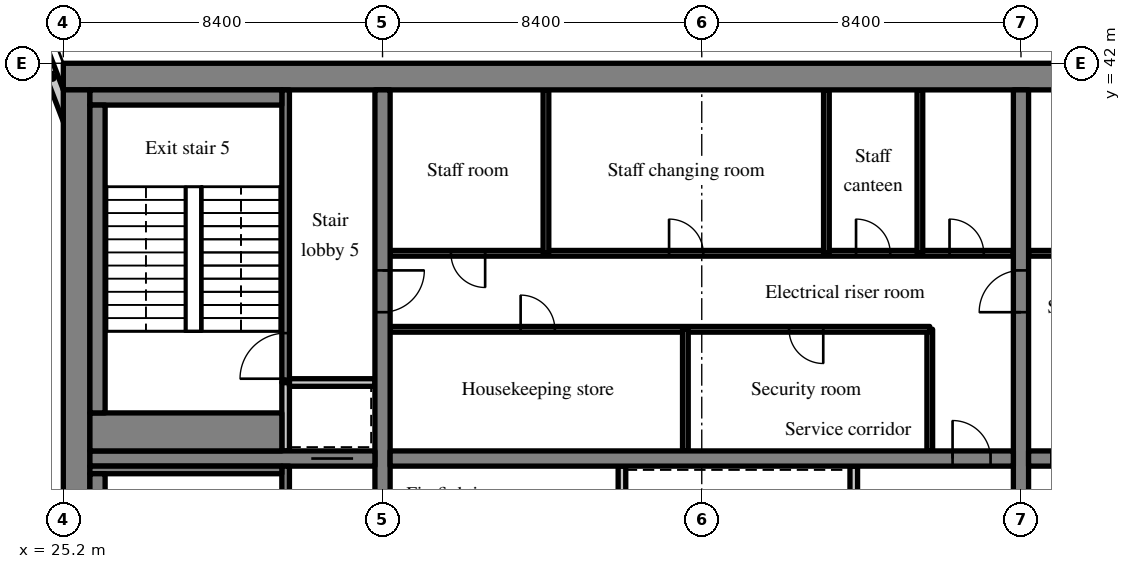
"""IFC4 building model, lengths in metres.
Left out: names, types, materials, properties, quantities, classifications, styles, units other than length and angle.
Written with IfcOpenShell. Run it as: python <this file> out.ifc"""

import sys

from ifc_helpers import new_model, si_unit, direction, frame, frame_2d, origin, place, context, subcontext, project, spatial, rectangle, extrude, source, transform, mapped, element, fill, save


model = new_model("IFC4")
c1 = context("Model", 3, precision=1e-05, world=origin(), true_north=direction((0.0, 1.0)))
c2 = subcontext(c1, "Body", "Model", "MODEL_VIEW")
j1 = project(units=[si_unit("LENGTHUNIT", "METRE"), si_unit("PLANEANGLEUNIT", "RADIAN")], contexts=[c1])
p1 = place(None, origin())
s1 = spatial("IfcSite", under=j1, at=p1, CompositionType="ELEMENT")
p2 = place(p1, origin())
s2 = spatial("IfcBuilding", under=s1, at=p2, CompositionType="ELEMENT")
p3 = place(p2, frame((0.0, 0.0, 178.2)))
s3 = spatial("IfcBuildingStorey", under=s2, at=p3, CompositionType="ELEMENT", Elevation=178.2)
m1 = source(origin(), c2, "Body", "SweptSolid", [
    extrude(rectangle(XDim=50.4, YDim=0.7, at=frame_2d((25.2, 0.0))), origin(), (0.0, 0.0, 1.0), 3.52),
])
p4 = place(p3, frame((25.2, 41.65, 0.0), z_axis=(0.0, 0.0, 1.0), x_axis=(1.0, 0.0, 0.0)))
e1 = element("IfcWall", 1, at=p4, inside=s3, PredefinedType="SHEAR", context=c2, shape_type="MappedRepresentation", body=[
    mapped(m1, transform((0.0, 0.0, 0.0), scale=1.0)),
])
m2 = source(origin(), c2, "Body", "SweptSolid", [
    extrude(rectangle(XDim=18.6, YDim=0.7, at=frame_2d((9.3, 0.0))), origin(), (0.0, 0.0, 1.0), 3.52),
])
p5 = place(p3, frame((25.55, 22.7, 0.0), z_axis=(0.0, 0.0, 1.0), x_axis=(0.0, 1.0, 0.0)))
e2 = element("IfcWall", 2, at=p5, inside=s3, PredefinedType="SHEAR", context=c2, shape_type="MappedRepresentation", body=[
    mapped(m2, transform((0.0, 0.0, 0.0), scale=1.0)),
])
m3 = source(origin(), c2, "Body", "SweptSolid", [
    extrude(rectangle(XDim=18.6, YDim=0.4, at=frame_2d((9.3, 0.0))), origin(), (0.0, 0.0, 1.0), 3.52),
])
p6 = place(p3, frame((33.6, 22.7, 0.0), z_axis=(0.0, 0.0, 1.0), x_axis=(0.0, 1.0, 0.0)))
e3 = element("IfcWall", 3, at=p6, inside=s3, PredefinedType="SHEAR", context=c2, shape_type="MappedRepresentation", body=[
    mapped(m3, transform((0.0, 0.0, 0.0), scale=1.0)),
])
m4 = source(origin(), c2, "Body", "SweptSolid", [
    extrude(rectangle(XDim=1.1, YDim=2.1, at=frame_2d((0.55, 1.05))), frame((0.0, 0.21, 0.0), z_axis=(0.0, -1.0, 0.0), x_axis=(1.0, 0.0, 0.0)), (0.0, 0.0, 1.0), 0.42),
])
p7 = place(p6, frame((12.75, 0.0, 0.0)))
e4 = element("IfcOpeningElement", 4, at=p7, cuts=e3, PredefinedType="OPENING", context=c2, shape_type="MappedRepresentation", body=[
    mapped(m4, transform((0.0, 0.0, 0.0), scale=1.0)),
])
p8 = place(p3, frame((50.4, 22.7, 0.0), z_axis=(0.0, 0.0, 1.0), x_axis=(0.0, 1.0, 0.0)))
e5 = element("IfcWall", 5, at=p8, inside=s3, PredefinedType="SHEAR", context=c2, shape_type="MappedRepresentation", body=[
    mapped(m3, transform((0.0, 0.0, 0.0), scale=1.0)),
])
p9 = place(p8, frame((12.75, 0.0, 0.0)))
e6 = element("IfcOpeningElement", 6, at=p9, cuts=e5, PredefinedType="OPENING", context=c2, shape_type="MappedRepresentation", body=[
    mapped(m4, transform((0.0, 0.0, 0.0), scale=1.0)),
])
m5 = source(origin(), c2, "Body", "SweptSolid", [
    extrude(rectangle(XDim=7.5, YDim=0.4, at=frame_2d((3.75, 0.0))), origin(), (0.0, 0.0, 1.0), 3.52),
])
p10 = place(p3, frame((25.9, 31.6, 0.0), z_axis=(0.0, 0.0, 1.0), x_axis=(1.0, 0.0, 0.0)))
e7 = element("IfcWall", 7, at=p10, inside=s3, PredefinedType="SHEAR", context=c2, shape_type="MappedRepresentation", body=[
    mapped(m5, transform((0.0, 0.0, 0.0), scale=1.0)),
])
p11 = place(p10, frame((5.825, 0.0, 0.0)))
e8 = element("IfcOpeningElement", 8, at=p11, cuts=e7, PredefinedType="OPENING", context=c2, shape_type="MappedRepresentation", body=[
    mapped(m4, transform((0.0, 0.0, 0.0), scale=1.0)),
])
m6 = source(origin(), c2, "Body", "SweptSolid", [
    extrude(rectangle(XDim=16.4, YDim=0.4, at=frame_2d((8.2, 0.0))), origin(), (0.0, 0.0, 1.0), 3.52),
])
p12 = place(p3, frame((33.8, 31.6, 0.0), z_axis=(0.0, 0.0, 1.0), x_axis=(1.0, 0.0, 0.0)))
e9 = element("IfcWall", 9, at=p12, inside=s3, PredefinedType="SHEAR", context=c2, shape_type="MappedRepresentation", body=[
    mapped(m6, transform((0.0, 0.0, 0.0), scale=1.0)),
])
m7 = source(origin(), c2, "Body", "SweptSolid", [
    extrude(rectangle(XDim=1.0, YDim=2.1, at=frame_2d((0.5, 1.05))), frame((0.0, 0.21, 0.0), z_axis=(0.0, -1.0, 0.0), x_axis=(1.0, 0.0, 0.0)), (0.0, 0.0, 1.0), 0.42),
])
p13 = place(p12, frame((14.8, 0.0, 0.0)))
e10 = element("IfcOpeningElement", 10, at=p13, cuts=e9, PredefinedType="OPENING", context=c2, shape_type="MappedRepresentation", body=[
    mapped(m7, transform((0.0, 0.0, 0.0), scale=1.0)),
])
p14 = place(p3, frame((50.6, 31.6, 0.0), z_axis=(0.0, 0.0, 1.0), x_axis=(1.0, 0.0, 0.0)))
e11 = element("IfcWall", 11, at=p14, inside=s3, PredefinedType="SHEAR", context=c2, shape_type="MappedRepresentation", body=[
    mapped(m6, transform((0.0, 0.0, 0.0), scale=1.0)),
])
p15 = place(p14, frame((0.6, 0.0, 0.0)))
e12 = element("IfcOpeningElement", 12, at=p15, cuts=e11, PredefinedType="OPENING", context=c2, shape_type="MappedRepresentation", body=[
    mapped(m7, transform((0.0, 0.0, 0.0), scale=1.0)),
])
m8 = source(origin(), c2, "Body", "SweptSolid", [
    extrude(rectangle(XDim=3.559, YDim=0.3, at=frame_2d((1.78, 0.0))), origin(), (0.0, 0.0, 1.0), 3.52),
])
p16 = place(p3, frame((25.55, 39.969, 0.0), z_axis=(0.0, 0.0, 1.0), x_axis=(-0.35779745313, 0.933799219604, 0.0)))
e13 = element("IfcWall", 13, at=p16, inside=s3, PredefinedType="SOLIDWALL", context=c2, shape_type="MappedRepresentation", body=[
    mapped(m8, transform((0.0, 0.0, 0.0), scale=1.0)),
])
m9 = source(origin(), c2, "Body", "SweptSolid", [
    extrude(rectangle(XDim=1.5, YDim=2.0, at=frame_2d((0.75, 1.0))), frame((0.0, 0.16, 0.0), z_axis=(0.0, -1.0, 0.0), x_axis=(1.0, 0.0, 0.0)), (0.0, 0.0, 1.0), 0.32),
])
p17 = place(p16, frame((1.903, 0.0, 0.9)))
e14 = element("IfcOpeningElement", 14, at=p17, cuts=e13, PredefinedType="OPENING", context=c2, shape_type="MappedRepresentation", body=[
    mapped(m9, transform((0.0, 0.0, 0.0), scale=1.0)),
])
m10 = source(origin(), c2, "Body", "SweptSolid", [
    extrude(rectangle(XDim=8.7, YDim=0.2, at=frame_2d((4.35, 0.0))), origin(), (0.0, 0.0, 1.0), 3.52),
])
p18 = place(p3, frame((39.9, 22.7, 0.0), z_axis=(0.0, 0.0, 1.0), x_axis=(0.0, 1.0, 0.0)))
e15 = element("IfcWall", 15, at=p18, inside=s3, PredefinedType="PARTITIONING", context=c2, shape_type="MappedRepresentation", body=[
    mapped(m10, transform((0.0, 0.0, 0.0), scale=1.0)),
])
m11 = source(origin(), c2, "Body", "SweptSolid", [
    extrude(rectangle(XDim=0.9, YDim=2.1, at=frame_2d((0.45, 1.05))), frame((0.0, 0.11, 0.0), z_axis=(0.0, -1.0, 0.0), x_axis=(1.0, 0.0, 0.0)), (0.0, 0.0, 1.0), 0.22),
])
p19 = place(p18, frame((4.85, 0.0, 0.0)))
e16 = element("IfcOpeningElement", 16, at=p19, cuts=e15, PredefinedType="OPENING", context=c2, shape_type="MappedRepresentation", body=[
    mapped(m11, transform((0.0, 0.0, 0.0), scale=1.0)),
])
m12 = source(origin(), c2, "Body", "SweptSolid", [
    extrude(rectangle(XDim=2.6, YDim=0.2, at=frame_2d((1.3, 0.0))), origin(), (0.0, 0.0, 1.0), 3.52),
])
p20 = place(p3, frame((46.0, 28.8, 0.0), z_axis=(0.0, 0.0, 1.0), x_axis=(0.0, 1.0, 0.0)))
e17 = element("IfcWall", 17, at=p20, inside=s3, PredefinedType="SOLIDWALL", context=c2, shape_type="MappedRepresentation", body=[
    mapped(m12, transform((0.0, 0.0, 0.0), scale=1.0)),
])
m13 = source(origin(), c2, "Body", "SweptSolid", [
    extrude(rectangle(XDim=3.2, YDim=0.15, at=frame_2d((1.6, 0.0))), origin(), (0.0, 0.0, 1.0), 3.52),
])
p21 = place(p3, frame((48.0, 31.8, 0.0), z_axis=(0.0, 0.0, 1.0), x_axis=(0.0, 1.0, 0.0)))
e18 = element("IfcWall", 18, at=p21, inside=s3, PredefinedType="PARTITIONING", context=c2, shape_type="MappedRepresentation", body=[
    mapped(m13, transform((0.0, 0.0, 0.0), scale=1.0)),
])
m14 = source(origin(), c2, "Body", "SweptSolid", [
    extrude(rectangle(XDim=14.2, YDim=0.15, at=frame_2d((7.1, 0.0))), origin(), (0.0, 0.0, 1.0), 3.52),
])
p22 = place(p3, frame((33.8, 35.0, 0.0), z_axis=(0.0, 0.0, 1.0), x_axis=(1.0, 0.0, 0.0)))
e19 = element("IfcWall", 19, at=p22, inside=s3, PredefinedType="PARTITIONING", context=c2, shape_type="MappedRepresentation", body=[
    mapped(m14, transform((0.0, 0.0, 0.0), scale=1.0)),
])
m15 = source(origin(), c2, "Body", "SweptSolid", [
    extrude(rectangle(XDim=0.9, YDim=2.1, at=frame_2d((0.45, 1.05))), frame((0.0, 0.085, 0.0), z_axis=(0.0, -1.0, 0.0), x_axis=(1.0, 0.0, 0.0)), (0.0, 0.0, 1.0), 0.17),
])
p23 = place(p22, frame((3.434, 0.0, 0.0)))
e20 = element("IfcOpeningElement", 20, at=p23, cuts=e19, PredefinedType="OPENING", context=c2, shape_type="MappedRepresentation", body=[
    mapped(m15, transform((0.0, 0.0, 0.0), scale=1.0)),
])
p24 = place(p22, frame((10.497, 0.0, 0.0)))
e21 = element("IfcOpeningElement", 21, at=p24, cuts=e19, PredefinedType="OPENING", context=c2, shape_type="MappedRepresentation", body=[
    mapped(m15, transform((0.0, 0.0, 0.0), scale=1.0)),
])
m16 = source(origin(), c2, "Body", "SweptSolid", [
    extrude(rectangle(XDim=16.4, YDim=0.15, at=frame_2d((8.2, 0.0))), origin(), (0.0, 0.0, 1.0), 3.52),
])
p25 = place(p3, frame((33.8, 37.0, 0.0), z_axis=(0.0, 0.0, 1.0), x_axis=(1.0, 0.0, 0.0)))
e22 = element("IfcWall", 22, at=p25, inside=s3, PredefinedType="PARTITIONING", context=c2, shape_type="MappedRepresentation", body=[
    mapped(m16, transform((0.0, 0.0, 0.0), scale=1.0)),
])
p26 = place(p25, frame((1.6, 0.0, 0.0)))
e23 = element("IfcOpeningElement", 23, at=p26, cuts=e22, PredefinedType="OPENING", context=c2, shape_type="MappedRepresentation", body=[
    mapped(m15, transform((0.0, 0.0, 0.0), scale=1.0)),
])
p27 = place(p25, frame((7.34, 0.0, 0.0)))
e24 = element("IfcOpeningElement", 24, at=p27, cuts=e22, PredefinedType="OPENING", context=c2, shape_type="MappedRepresentation", body=[
    mapped(m15, transform((0.0, 0.0, 0.0), scale=1.0)),
])
p28 = place(p25, frame((12.26, 0.0, 0.0)))
e25 = element("IfcOpeningElement", 25, at=p28, cuts=e22, PredefinedType="OPENING", context=c2, shape_type="MappedRepresentation", body=[
    mapped(m15, transform((0.0, 0.0, 0.0), scale=1.0)),
])
p29 = place(p25, frame((14.72, 0.0, 0.0)))
e26 = element("IfcOpeningElement", 26, at=p29, cuts=e22, PredefinedType="OPENING", context=c2, shape_type="MappedRepresentation", body=[
    mapped(m15, transform((0.0, 0.0, 0.0), scale=1.0)),
])
p30 = place(p3, frame((41.569, 31.8, 0.0), z_axis=(0.0, 0.0, 1.0), x_axis=(0.0, 1.0, 0.0)))
e27 = element("IfcWall", 27, at=p30, inside=s3, PredefinedType="PARTITIONING", context=c2, shape_type="MappedRepresentation", body=[
    mapped(m13, transform((0.0, 0.0, 0.0), scale=1.0)),
])
m17 = source(origin(), c2, "Body", "SweptSolid", [
    extrude(rectangle(XDim=4.3, YDim=0.15, at=frame_2d((2.15, 0.0))), origin(), (0.0, 0.0, 1.0), 3.52),
])
for number, where, z_axis, x_axis in (
    (28, (37.9, 37.0, 0.0), (0.0, 0.0, 1.0), (0.0, 1.0, 0.0)),
    (29, (45.28, 37.0, 0.0), (0.0, 0.0, 1.0), (0.0, 1.0, 0.0)),
    (30, (47.74, 37.0, 0.0), (0.0, 0.0, 1.0), (0.0, 1.0, 0.0)),
):
    element("IfcWall", number, at=place(p3, frame(where, z_axis=z_axis, x_axis=x_axis)), inside=s3, PredefinedType="PARTITIONING", context=c2, shape_type="MappedRepresentation", body=[
        mapped(m17, transform((0.0, 0.0, 0.0), scale=1.0)),
    ])
p31 = place(p3, frame((67.0, 37.0, 0.0), z_axis=(0.0, 0.0, 1.0), x_axis=(-1.0, 0.0, 0.0)))
e31 = element("IfcWall", 31, at=p31, inside=s3, PredefinedType="PARTITIONING", context=c2, shape_type="MappedRepresentation", body=[
    mapped(m16, transform((0.0, 0.0, 0.0), scale=1.0)),
])
p32 = place(p31, frame((3.24, 0.0, 0.0)))
e32 = element("IfcOpeningElement", 32, at=p32, cuts=e31, PredefinedType="OPENING", context=c2, shape_type="MappedRepresentation", body=[
    mapped(m15, transform((0.0, 0.0, 0.0), scale=1.0)),
])
p33 = place(p31, frame((8.16, 0.0, 0.0)))
e33 = element("IfcOpeningElement", 33, at=p33, cuts=e31, PredefinedType="OPENING", context=c2, shape_type="MappedRepresentation", body=[
    mapped(m15, transform((0.0, 0.0, 0.0), scale=1.0)),
])
p34 = place(p31, frame((11.44, 0.0, 0.0)))
e34 = element("IfcOpeningElement", 34, at=p34, cuts=e31, PredefinedType="OPENING", context=c2, shape_type="MappedRepresentation", body=[
    mapped(m15, transform((0.0, 0.0, 0.0), scale=1.0)),
])
p35 = place(p31, frame((14.72, 0.0, 0.0)))
e35 = element("IfcOpeningElement", 35, at=p35, cuts=e31, PredefinedType="OPENING", context=c2, shape_type="MappedRepresentation", body=[
    mapped(m15, transform((0.0, 0.0, 0.0), scale=1.0)),
])
m18 = source(origin(), c2, "Body", "SweptSolid", [
    extrude(rectangle(XDim=8.7, YDim=0.2, at=frame_2d((4.35, 0.0))), origin(), (0.0, 0.0, 1.0), 3.52),
])
p36 = place(p3, frame((31.05, 22.7, 0.0), z_axis=(0.0, 0.0, 1.0), x_axis=(0.0, 1.0, 0.0)))
e36 = element("IfcWall", 36, at=p36, inside=s3, PredefinedType="SOLIDWALL", context=c2, shape_type="MappedRepresentation", body=[
    mapped(m18, transform((0.0, 0.0, 0.0), scale=1.0)),
])
m19 = source(origin(), c2, "Body", "SweptSolid", [
    extrude(rectangle(XDim=1.2, YDim=2.1, at=frame_2d((0.6, 1.05))), frame((0.0, 0.11, 0.0), z_axis=(0.0, -1.0, 0.0), x_axis=(1.0, 0.0, 0.0)), (0.0, 0.0, 1.0), 0.22),
])
p37 = place(p36, frame((0.9, 0.0, 0.0)))
e37 = element("IfcOpeningElement", 37, at=p37, cuts=e36, PredefinedType="OPENING", context=c2, shape_type="MappedRepresentation", body=[
    mapped(m19, transform((0.0, 0.0, 0.0), scale=1.0)),
])
m20 = source(origin(), c2, "Body", "SweptSolid", [
    extrude(rectangle(XDim=1.8, YDim=0.2, at=frame_2d((0.9, 0.0))), origin(), (0.0, 0.0, 1.0), 3.52),
])
p38 = place(p3, frame((31.05, 31.8, 0.0), z_axis=(0.0, 0.0, 1.0), x_axis=(0.0, 1.0, 0.0)))
e38 = element("IfcWall", 38, at=p38, inside=s3, PredefinedType="SOLIDWALL", context=c2, shape_type="MappedRepresentation", body=[
    mapped(m20, transform((0.0, 0.0, 0.0), scale=1.0)),
])
m21 = source(origin(), c2, "Body", "SweptSolid", [
    extrude(rectangle(XDim=2.25, YDim=0.2, at=frame_2d((1.125, 0.0))), origin(), (0.0, 0.0, 1.0), 3.52),
])
p39 = place(p3, frame((31.15, 33.6, 0.0), z_axis=(0.0, 0.0, 1.0), x_axis=(1.0, 0.0, 0.0)))
e39 = element("IfcWall", 39, at=p39, inside=s3, PredefinedType="SOLIDWALL", context=c2, shape_type="MappedRepresentation", body=[
    mapped(m21, transform((0.0, 0.0, 0.0), scale=1.0)),
])
m22 = source(origin(), c2, "Body", "SweptSolid", [
    extrude(rectangle(XDim=7.7, YDim=0.2, at=frame_2d((3.85, 0.0))), origin(), (0.0, 0.0, 1.0), 3.52),
])
p40 = place(p3, frame((31.05, 33.6, 0.0), z_axis=(0.0, 0.0, 1.0), x_axis=(0.0, 1.0, 0.0)))
e40 = element("IfcWall", 40, at=p40, inside=s3, PredefinedType="SOLIDWALL", context=c2, shape_type="MappedRepresentation", body=[
    mapped(m22, transform((0.0, 0.0, 0.0), scale=1.0)),
])
p41 = place(p40, frame((0.1, 0.0, 0.0)))
e41 = element("IfcOpeningElement", 41, at=p41, cuts=e40, PredefinedType="OPENING", context=c2, shape_type="MappedRepresentation", body=[
    mapped(m19, transform((0.0, 0.0, 0.0), scale=1.0)),
])
m23 = source(origin(), c2, "Body", "SweptSolid", [
    extrude(rectangle(XDim=5.05, YDim=0.2, at=frame_2d((2.525, 0.0))), origin(), (0.0, 0.0, 1.0), 3.52),
])
p42 = place(p3, frame((25.9, 31.3, 0.0), z_axis=(0.0, 0.0, 1.0), x_axis=(1.0, 0.0, 0.0)))
e42 = element("IfcWall", 42, at=p42, inside=s3, PredefinedType="SOLIDWALL", context=c2, shape_type="MappedRepresentation", body=[
    mapped(m23, transform((0.0, 0.0, 0.0), scale=1.0)),
])
m24 = source(origin(), c2, "Body", "SweptSolid", [
    extrude(rectangle(XDim=8.1, YDim=0.4, at=frame_2d((4.05, 0.0))), origin(), (0.0, 0.0, 1.0), 3.52),
])
p43 = place(p3, frame((26.1, 23.1, 0.0), z_axis=(0.0, 0.0, 1.0), x_axis=(0.0, 1.0, 0.0)))
e43 = element("IfcWall", 43, at=p43, inside=s3, PredefinedType="SOLIDWALL", context=c2, shape_type="MappedRepresentation", body=[
    mapped(m24, transform((0.0, 0.0, 0.0), scale=1.0)),
])
m25 = source(origin(), c2, "Body", "SweptSolid", [
    extrude(rectangle(XDim=5.05, YDim=0.4, at=frame_2d((2.525, 0.0))), origin(), (0.0, 0.0, 1.0), 3.52),
])
p44 = place(p3, frame((25.9, 41.1, 0.0), z_axis=(0.0, 0.0, 1.0), x_axis=(1.0, 0.0, 0.0)))
e44 = element("IfcWall", 44, at=p44, inside=s3, PredefinedType="SOLIDWALL", context=c2, shape_type="MappedRepresentation", body=[
    mapped(m25, transform((0.0, 0.0, 0.0), scale=1.0)),
])
m26 = source(origin(), c2, "Body", "SweptSolid", [
    extrude(rectangle(XDim=5.05, YDim=1.0, at=frame_2d((2.525, 0.0))), origin(), (0.0, 0.0, 1.0), 3.52),
])
p45 = place(p3, frame((25.9, 32.3, 0.0), z_axis=(0.0, 0.0, 1.0), x_axis=(1.0, 0.0, 0.0)))
e45 = element("IfcWall", 45, at=p45, inside=s3, PredefinedType="SOLIDWALL", context=c2, shape_type="MappedRepresentation", body=[
    mapped(m26, transform((0.0, 0.0, 0.0), scale=1.0)),
])
p46 = place(p3, frame((26.1, 32.8, 0.0), z_axis=(0.0, 0.0, 1.0), x_axis=(0.0, 1.0, 0.0)))
e46 = element("IfcWall", 46, at=p46, inside=s3, PredefinedType="SOLIDWALL", context=c2, shape_type="MappedRepresentation", body=[
    mapped(m24, transform((0.0, 0.0, 0.0), scale=1.0)),
])
m27 = source(origin(), c2, "Body", "SweptSolid", [
    extrude(rectangle(XDim=1.0, YDim=2.1, at=frame_2d((0.5, 1.05))), frame((0.0, 0.025, 0.0), z_axis=(0.0, -1.0, 0.0), x_axis=(1.0, 0.0, 0.0)), (0.0, 0.0, 1.0), 0.05),
])
p47 = place(p13, origin())
e47 = element("IfcDoor", 47, at=p47, inside=s3, OperationType="SINGLE_SWING_LEFT", PredefinedType="DOOR", context=c2, shape_type="MappedRepresentation", body=[
    mapped(m27, transform((0.0, 0.0, 0.0), scale=1.0)),
])
fill(e10, e47)
m28 = source(origin(), c2, "Body", "SweptSolid", [
    extrude(rectangle(XDim=0.9, YDim=2.1, at=frame_2d((0.45, 1.05))), frame((0.0, 0.025, 0.0), z_axis=(0.0, -1.0, 0.0), x_axis=(1.0, 0.0, 0.0)), (0.0, 0.0, 1.0), 0.05),
])
p48 = place(p23, origin())
e48 = element("IfcDoor", 48, at=p48, inside=s3, OperationType="SINGLE_SWING_LEFT", PredefinedType="DOOR", context=c2, shape_type="MappedRepresentation", body=[
    mapped(m28, transform((0.0, 0.0, 0.0), scale=1.0)),
])
fill(e20, e48)
p49 = place(p24, origin())
e49 = element("IfcDoor", 49, at=p49, inside=s3, OperationType="SINGLE_SWING_RIGHT", PredefinedType="DOOR", context=c2, shape_type="MappedRepresentation", body=[
    mapped(m28, transform((0.0, 0.0, 0.0), scale=1.0)),
])
fill(e21, e49)
p50 = place(p26, origin())
e50 = element("IfcDoor", 50, at=p50, inside=s3, OperationType="SINGLE_SWING_RIGHT", PredefinedType="DOOR", context=c2, shape_type="MappedRepresentation", body=[
    mapped(m28, transform((0.0, 0.0, 0.0), scale=1.0)),
])
fill(e23, e50)
p51 = place(p27, origin())
e51 = element("IfcDoor", 51, at=p51, inside=s3, OperationType="SINGLE_SWING_LEFT", PredefinedType="DOOR", context=c2, shape_type="MappedRepresentation", body=[
    mapped(m28, transform((0.0, 0.0, 0.0), scale=1.0)),
])
fill(e24, e51)
p52 = place(p28, origin())
e52 = element("IfcDoor", 52, at=p52, inside=s3, OperationType="SINGLE_SWING_LEFT", PredefinedType="DOOR", context=c2, shape_type="MappedRepresentation", body=[
    mapped(m28, transform((0.0, 0.0, 0.0), scale=1.0)),
])
fill(e25, e52)
p53 = place(p29, origin())
e53 = element("IfcDoor", 53, at=p53, inside=s3, OperationType="SINGLE_SWING_LEFT", PredefinedType="DOOR", context=c2, shape_type="MappedRepresentation", body=[
    mapped(m28, transform((0.0, 0.0, 0.0), scale=1.0)),
])
fill(e26, e53)
m29 = source(origin(), c2, "Body", "SweptSolid", [
    extrude(rectangle(XDim=1.1, YDim=2.1, at=frame_2d((0.55, 1.05))), frame((0.0, 0.025, 0.0), z_axis=(0.0, -1.0, 0.0), x_axis=(1.0, 0.0, 0.0)), (0.0, 0.0, 1.0), 0.05),
])
p54 = place(p11, origin())
e54 = element("IfcDoor", 54, at=p54, inside=s3, OperationType="SLIDING_TO_LEFT", PredefinedType="DOOR", context=c2, shape_type="MappedRepresentation", body=[
    mapped(m29, transform((0.0, 0.0, 0.0), scale=1.0)),
])
fill(e8, e54)
m30 = source(origin(), c2, "Body", "SweptSolid", [
    extrude(rectangle(XDim=1.2, YDim=2.1, at=frame_2d((0.6, 1.05))), frame((0.0, 0.025, 0.0), z_axis=(0.0, -1.0, 0.0), x_axis=(1.0, 0.0, 0.0)), (0.0, 0.0, 1.0), 0.05),
])
p55 = place(p41, origin())
e55 = element("IfcDoor", 55, at=p55, inside=s3, OperationType="SINGLE_SWING_LEFT", PredefinedType="DOOR", context=c2, shape_type="MappedRepresentation", body=[
    mapped(m30, transform((0.0, 0.0, 0.0), scale=1.0)),
])
fill(e41, e55)
p56 = place(p7, origin())
e56 = element("IfcDoor", 56, at=p56, inside=s3, OperationType="SINGLE_SWING_RIGHT", PredefinedType="DOOR", context=c2, shape_type="MappedRepresentation", body=[
    mapped(m29, transform((0.0, 0.0, 0.0), scale=1.0)),
])
fill(e4, e56)
p57 = place(p9, origin())
e57 = element("IfcDoor", 57, at=p57, inside=s3, OperationType="SINGLE_SWING_LEFT", PredefinedType="DOOR", context=c2, shape_type="MappedRepresentation", body=[
    mapped(m29, transform((0.0, 0.0, 0.0), scale=1.0)),
])
fill(e6, e57)
save(model, sys.argv[1])
